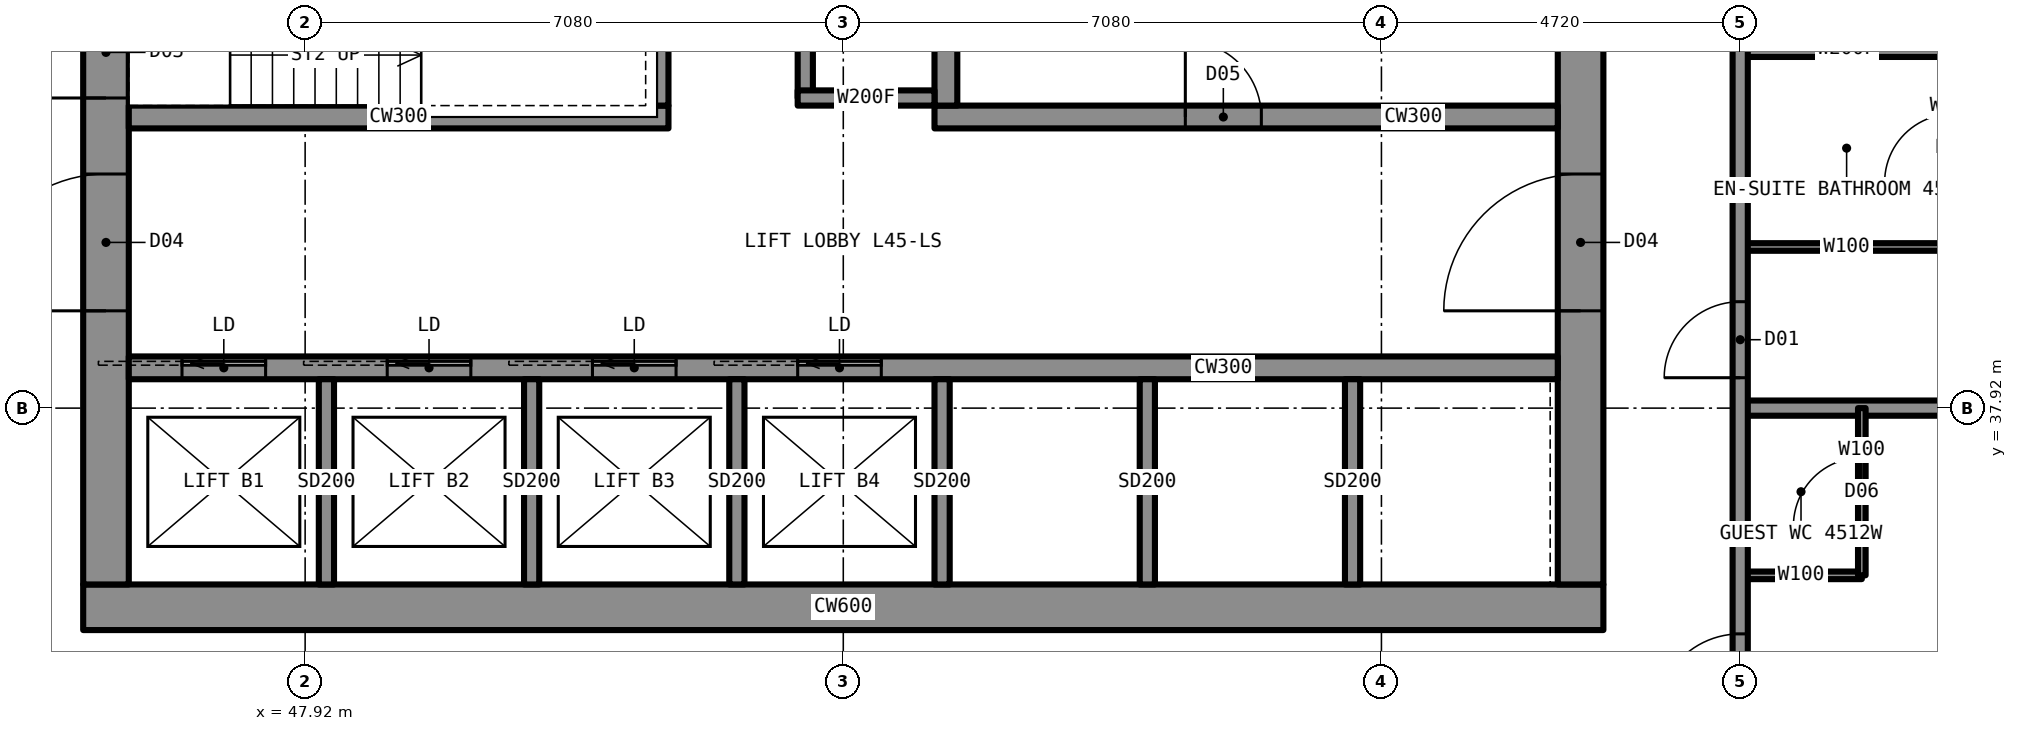
"""IFC4 building model, lengths in metres.
Left out: names, types, materials, properties, quantities, classifications, styles, units other than length and angle.
Written with IfcOpenShell. Run it as: python <this file> out.ifc"""

import sys

from ifc_helpers import new_model, si_unit, direction, frame, frame_2d, origin, place, context, subcontext, project, spatial, rectangle, extrude, element, fill, save


model = new_model("IFC4")
c1 = context("Model", 3, precision=1e-05, world=origin(), true_north=direction((0.0, 1.0)))
c2 = subcontext(c1, "Body", "Model", "MODEL_VIEW")
j1 = project(units=[si_unit("LENGTHUNIT", "METRE"), si_unit("PLANEANGLEUNIT", "RADIAN")], contexts=[c1])
p1 = place(None, origin())
s1 = spatial("IfcSite", under=j1, at=p1, CompositionType="ELEMENT")
p2 = place(p1, origin())
s2 = spatial("IfcBuilding", under=s1, at=p2, CompositionType="ELEMENT")
p3 = place(p2, frame((0.0, 0.0, 161.8)))
s3 = spatial("IfcBuildingStorey", under=s2, at=p3, CompositionType="ELEMENT", Elevation=161.8)
p4 = place(p3, frame((45.0, 35.3, 0.0), z_axis=(0.0, 0.0, 1.0), x_axis=(1.0, 0.0, 0.0)))
e1 = element("IfcWall", 1, at=p4, inside=s3, PredefinedType="SHEAR", context=c2, shape_type="SweptSolid", body=[
    extrude(rectangle(XDim=20.0, YDim=0.6, at=frame_2d((10.0, 0.0))), origin(), (0.0, 0.0, 1.0), 3.5),
])
p5 = place(p3, frame((64.7, 35.6, 0.0), z_axis=(0.0, 0.0, 1.0), x_axis=(0.0, 1.0, 0.0)))
e2 = element("IfcWall", 2, at=p5, inside=s3, PredefinedType="SHEAR", context=c2, shape_type="SweptSolid", body=[
    extrude(rectangle(XDim=18.8, YDim=0.6, at=frame_2d((9.4, 0.0))), origin(), (0.0, 0.0, 1.0), 3.5),
])
p6 = place(p5, frame((13.4, 0.0, 0.0)))
e3 = element("IfcOpeningElement", 3, at=p6, cuts=e2, PredefinedType="OPENING", context=c2, shape_type="SweptSolid", body=[
    extrude(rectangle(XDim=1.8, YDim=2.2, at=frame_2d((0.9, 1.1))), frame((0.0, 0.31, 0.0), z_axis=(0.0, -1.0, 0.0), x_axis=(1.0, 0.0, 0.0)), (0.0, 0.0, 1.0), 0.62),
])
p7 = place(p5, frame((3.6, 0.0, 0.0)))
e4 = element("IfcOpeningElement", 4, at=p7, cuts=e2, PredefinedType="OPENING", context=c2, shape_type="SweptSolid", body=[
    extrude(rectangle(XDim=1.8, YDim=2.2, at=frame_2d((0.9, 1.1))), frame((0.0, 0.31, 0.0), z_axis=(0.0, -1.0, 0.0), x_axis=(1.0, 0.0, 0.0)), (0.0, 0.0, 1.0), 0.62),
])
p8 = place(p3, frame((45.3, 35.6, 0.0), z_axis=(0.0, 0.0, 1.0), x_axis=(0.0, 1.0, 0.0)))
e5 = element("IfcWall", 5, at=p8, inside=s3, PredefinedType="SHEAR", context=c2, shape_type="SweptSolid", body=[
    extrude(rectangle(XDim=18.8, YDim=0.6, at=frame_2d((9.4, 0.0))), origin(), (0.0, 0.0, 1.0), 3.5),
])
p9 = place(p8, frame((13.4, 0.0, 0.0)))
e6 = element("IfcOpeningElement", 6, at=p9, cuts=e5, PredefinedType="OPENING", context=c2, shape_type="SweptSolid", body=[
    extrude(rectangle(XDim=1.8, YDim=2.2, at=frame_2d((0.9, 1.1))), frame((0.0, 0.31, 0.0), z_axis=(0.0, -1.0, 0.0), x_axis=(1.0, 0.0, 0.0)), (0.0, 0.0, 1.0), 0.62),
])
p10 = place(p8, frame((3.6, 0.0, 0.0)))
e7 = element("IfcOpeningElement", 7, at=p10, cuts=e5, PredefinedType="OPENING", context=c2, shape_type="SweptSolid", body=[
    extrude(rectangle(XDim=1.8, YDim=2.2, at=frame_2d((0.9, 1.1))), frame((0.0, 0.31, 0.0), z_axis=(0.0, -1.0, 0.0), x_axis=(1.0, 0.0, 0.0)), (0.0, 0.0, 1.0), 0.62),
])
p11 = place(p8, frame((6.4, 0.0, 0.0)))
e8 = element("IfcOpeningElement", 8, at=p11, cuts=e5, PredefinedType="OPENING", context=c2, shape_type="SweptSolid", body=[
    extrude(rectangle(XDim=1.2, YDim=2.2, at=frame_2d((0.6, 1.1))), frame((0.0, 0.31, 0.0), z_axis=(0.0, -1.0, 0.0), x_axis=(1.0, 0.0, 0.0)), (0.0, 0.0, 1.0), 0.62),
])
p12 = place(p3, frame((45.6, 38.45, 0.0), z_axis=(0.0, 0.0, 1.0), x_axis=(1.0, 0.0, 0.0)))
e9 = element("IfcWall", 9, at=p12, inside=s3, PredefinedType="SHEAR", context=c2, shape_type="SweptSolid", body=[
    extrude(rectangle(XDim=18.8, YDim=0.3, at=frame_2d((9.4, 0.0))), origin(), (0.0, 0.0, 1.0), 3.5),
])
p13 = place(p12, frame((0.7, 0.0, 0.0)))
e10 = element("IfcOpeningElement", 10, at=p13, cuts=e9, PredefinedType="OPENING", context=c2, shape_type="SweptSolid", body=[
    extrude(rectangle(XDim=1.1, YDim=2.2, at=frame_2d((0.55, 1.1))), frame((0.0, 0.16, 0.0), z_axis=(0.0, -1.0, 0.0), x_axis=(1.0, 0.0, 0.0)), (0.0, 0.0, 1.0), 0.32),
])
p14 = place(p12, frame((3.4, 0.0, 0.0)))
e11 = element("IfcOpeningElement", 11, at=p14, cuts=e9, PredefinedType="OPENING", context=c2, shape_type="SweptSolid", body=[
    extrude(rectangle(XDim=1.1, YDim=2.2, at=frame_2d((0.55, 1.1))), frame((0.0, 0.16, 0.0), z_axis=(0.0, -1.0, 0.0), x_axis=(1.0, 0.0, 0.0)), (0.0, 0.0, 1.0), 0.32),
])
p15 = place(p12, frame((6.1, 0.0, 0.0)))
e12 = element("IfcOpeningElement", 12, at=p15, cuts=e9, PredefinedType="OPENING", context=c2, shape_type="SweptSolid", body=[
    extrude(rectangle(XDim=1.1, YDim=2.2, at=frame_2d((0.55, 1.1))), frame((0.0, 0.16, 0.0), z_axis=(0.0, -1.0, 0.0), x_axis=(1.0, 0.0, 0.0)), (0.0, 0.0, 1.0), 0.32),
])
p16 = place(p12, frame((8.8, 0.0, 0.0)))
e13 = element("IfcOpeningElement", 13, at=p16, cuts=e9, PredefinedType="OPENING", context=c2, shape_type="SweptSolid", body=[
    extrude(rectangle(XDim=1.1, YDim=2.2, at=frame_2d((0.55, 1.1))), frame((0.0, 0.16, 0.0), z_axis=(0.0, -1.0, 0.0), x_axis=(1.0, 0.0, 0.0)), (0.0, 0.0, 1.0), 0.32),
])
p17 = place(p3, frame((45.6, 41.75, 0.0), z_axis=(0.0, 0.0, 1.0), x_axis=(1.0, 0.0, 0.0)))
e14 = element("IfcWall", 14, at=p17, inside=s3, PredefinedType="SHEAR", context=c2, shape_type="SweptSolid", body=[
    extrude(rectangle(XDim=7.1, YDim=0.3, at=frame_2d((3.55, 0.0))), origin(), (0.0, 0.0, 1.0), 3.5),
])
p18 = place(p3, frame((56.2, 41.75, 0.0), z_axis=(0.0, 0.0, 1.0), x_axis=(1.0, 0.0, 0.0)))
e15 = element("IfcWall", 15, at=p18, inside=s3, PredefinedType="SHEAR", context=c2, shape_type="SweptSolid", body=[
    extrude(rectangle(XDim=8.2, YDim=0.3, at=frame_2d((4.1, 0.0))), origin(), (0.0, 0.0, 1.0), 3.5),
])
p19 = place(p18, frame((3.3, 0.0, 0.0)))
e16 = element("IfcOpeningElement", 16, at=p19, cuts=e15, PredefinedType="OPENING", context=c2, shape_type="SweptSolid", body=[
    extrude(rectangle(XDim=1.0, YDim=2.1, at=frame_2d((0.5, 1.05))), frame((0.0, 0.16, 0.0), z_axis=(0.0, -1.0, 0.0), x_axis=(1.0, 0.0, 0.0)), (0.0, 0.0, 1.0), 0.32),
])
p20 = place(p3, frame((52.55, 41.9, 0.0), z_axis=(0.0, 0.0, 1.0), x_axis=(0.0, 1.0, 0.0)))
e17 = element("IfcWall", 17, at=p20, inside=s3, PredefinedType="SHEAR", context=c2, shape_type="SweptSolid", body=[
    extrude(rectangle(XDim=6.2, YDim=0.3, at=frame_2d((3.1, 0.0))), origin(), (0.0, 0.0, 1.0), 3.5),
])
p21 = place(p20, frame((4.125, 0.0, 0.0)))
e18 = element("IfcOpeningElement", 18, at=p21, cuts=e17, PredefinedType="OPENING", context=c2, shape_type="SweptSolid", body=[
    extrude(rectangle(XDim=1.2, YDim=2.2, at=frame_2d((0.6, 1.1))), frame((0.0, 0.16, 0.0), z_axis=(0.0, -1.0, 0.0), x_axis=(1.0, 0.0, 0.0)), (0.0, 0.0, 1.0), 0.32),
])
p22 = place(p3, frame((56.35, 41.9, 0.0), z_axis=(0.0, 0.0, 1.0), x_axis=(0.0, 1.0, 0.0)))
e19 = element("IfcWall", 19, at=p22, inside=s3, PredefinedType="SHEAR", context=c2, shape_type="SweptSolid", body=[
    extrude(rectangle(XDim=9.5, YDim=0.3, at=frame_2d((4.75, 0.0))), origin(), (0.0, 0.0, 1.0), 3.5),
])
p23 = place(p22, frame((7.1, 0.0, 0.0)))
e20 = element("IfcOpeningElement", 20, at=p23, cuts=e19, PredefinedType="OPENING", context=c2, shape_type="SweptSolid", body=[
    extrude(rectangle(XDim=1.8, YDim=2.2, at=frame_2d((0.9, 1.1))), frame((0.0, 0.16, 0.0), z_axis=(0.0, -1.0, 0.0), x_axis=(1.0, 0.0, 0.0)), (0.0, 0.0, 1.0), 0.32),
])
p24 = place(p3, frame((66.8, 42.64, 0.0), z_axis=(0.0, 0.0, 1.0), x_axis=(1.0, 0.0, 0.0)))
e21 = element("IfcWall", 21, at=p24, inside=s3, PredefinedType="PARTITIONING", context=c2, shape_type="SweptSolid", body=[
    extrude(rectangle(XDim=2.8, YDim=0.2, at=frame_2d((1.4, 0.0))), origin(), (0.0, 0.0, 1.0), 2.73),
])
p25 = place(p3, frame((66.8, 40.04, 0.0), z_axis=(0.0, 0.0, 1.0), x_axis=(1.0, 0.0, 0.0)))
e22 = element("IfcWall", 22, at=p25, inside=s3, PredefinedType="PARTITIONING", context=c2, shape_type="SweptSolid", body=[
    extrude(rectangle(XDim=2.8, YDim=0.1, at=frame_2d((1.4, 0.0))), origin(), (0.0, 0.0, 1.0), 3.33),
])
p26 = place(p3, frame((66.8, 37.92, 0.0), z_axis=(0.0, 0.0, 1.0), x_axis=(1.0, 0.0, 0.0)))
e23 = element("IfcWall", 23, at=p26, inside=s3, PredefinedType="PARTITIONING", context=c2, shape_type="SweptSolid", body=[
    extrude(rectangle(XDim=7.2, YDim=0.2, at=frame_2d((3.6, 0.0))), origin(), (0.0, 0.0, 1.0), 2.573),
])
p27 = place(p3, frame((66.8, 35.72, 0.0), z_axis=(0.0, 0.0, 1.0), x_axis=(1.0, 0.0, 0.0)))
e24 = element("IfcWall", 24, at=p27, inside=s3, PredefinedType="PARTITIONING", context=c2, shape_type="SweptSolid", body=[
    extrude(rectangle(XDim=1.6, YDim=0.1, at=frame_2d((0.8, 0.0))), origin(), (0.0, 0.0, 1.0), 3.33),
])
p28 = place(p3, frame((66.8, 33.22, 0.0), z_axis=(0.0, 0.0, 1.0), x_axis=(0.0, 1.0, 0.0)))
e25 = element("IfcWall", 25, at=p28, inside=s3, PredefinedType="PARTITIONING", context=c2, shape_type="SweptSolid", body=[
    extrude(rectangle(XDim=23.56, YDim=0.2, at=frame_2d((11.78, 0.0))), origin(), (0.0, 0.0, 1.0), 3.33),
])
p29 = place(p28, frame((5.1, 0.0, 0.0)))
e26 = element("IfcOpeningElement", 26, at=p29, cuts=e25, PredefinedType="OPENING", context=c2, shape_type="SweptSolid", body=[
    extrude(rectangle(XDim=1.0, YDim=2.2, at=frame_2d((0.5, 1.1))), frame((0.0, 0.11, 0.0), z_axis=(0.0, -1.0, 0.0), x_axis=(1.0, 0.0, 0.0)), (0.0, 0.0, 1.0), 0.22),
])
p30 = place(p28, frame((12.42, 0.0, 0.0)))
e27 = element("IfcOpeningElement", 27, at=p30, cuts=e25, PredefinedType="OPENING", context=c2, shape_type="SweptSolid", body=[
    extrude(rectangle(XDim=1.0, YDim=2.2, at=frame_2d((0.5, 1.1))), frame((0.0, 0.11, 0.0), z_axis=(0.0, -1.0, 0.0), x_axis=(1.0, 0.0, 0.0)), (0.0, 0.0, 1.0), 0.22),
])
p31 = place(p28, frame((22.03, 0.0, 0.0)))
e28 = element("IfcOpeningElement", 28, at=p31, cuts=e25, PredefinedType="OPENING", context=c2, shape_type="SweptSolid", body=[
    extrude(rectangle(XDim=1.1, YDim=2.2, at=frame_2d((0.55, 1.1))), frame((0.0, 0.11, 0.0), z_axis=(0.0, -1.0, 0.0), x_axis=(1.0, 0.0, 0.0)), (0.0, 0.0, 1.0), 0.22),
])
p32 = place(p28, frame((0.63, 0.0, 0.0)))
e29 = element("IfcOpeningElement", 29, at=p32, cuts=e25, PredefinedType="OPENING", context=c2, shape_type="SweptSolid", body=[
    extrude(rectangle(XDim=1.1, YDim=2.2, at=frame_2d((0.55, 1.1))), frame((0.0, 0.11, 0.0), z_axis=(0.0, -1.0, 0.0), x_axis=(1.0, 0.0, 0.0)), (0.0, 0.0, 1.0), 0.22),
])
p33 = place(p3, frame((68.4, 35.72, 0.0), z_axis=(0.0, 0.0, 1.0), x_axis=(0.0, 1.0, 0.0)))
e30 = element("IfcWall", 30, at=p33, inside=s3, PredefinedType="PARTITIONING", context=c2, shape_type="SweptSolid", body=[
    extrude(rectangle(XDim=2.2, YDim=0.1, at=frame_2d((1.1, 0.0))), origin(), (0.0, 0.0, 1.0), 3.33),
])
p34 = place(p33, frame((0.65, 0.0, 0.0)))
e31 = element("IfcOpeningElement", 31, at=p34, cuts=e30, PredefinedType="OPENING", context=c2, shape_type="SweptSolid", body=[
    extrude(rectangle(XDim=0.9, YDim=2.1, at=frame_2d((0.45, 1.05))), frame((0.0, 0.06, 0.0), z_axis=(0.0, -1.0, 0.0), x_axis=(1.0, 0.0, 0.0)), (0.0, 0.0, 1.0), 0.12),
])
p35 = place(p3, frame((54.5, 42.0, 0.0), z_axis=(0.0, 0.0, 1.0), x_axis=(0.0, 1.0, 0.0)))
e32 = element("IfcWall", 32, at=p35, inside=s3, PredefinedType="PARTITIONING", context=c2, shape_type="SweptSolid", body=[
    extrude(rectangle(XDim=2.0, YDim=0.2, at=frame_2d((1.0, 0.0))), origin(), (0.0, 0.0, 1.0), 3.33),
])
p36 = place(p35, frame((0.5, 0.0, 0.0)))
e33 = element("IfcOpeningElement", 33, at=p36, cuts=e32, PredefinedType="OPENING", context=c2, shape_type="SweptSolid", body=[
    extrude(rectangle(XDim=1.0, YDim=2.1, at=frame_2d((0.5, 1.05))), frame((0.0, 0.11, 0.0), z_axis=(0.0, -1.0, 0.0), x_axis=(1.0, 0.0, 0.0)), (0.0, 0.0, 1.0), 0.22),
])
p37 = place(p3, frame((54.4, 42.0, 0.0), z_axis=(0.0, 0.0, 1.0), x_axis=(1.0, 0.0, 0.0)))
e34 = element("IfcWall", 34, at=p37, inside=s3, PredefinedType="PARTITIONING", context=c2, shape_type="SweptSolid", body=[
    extrude(rectangle(XDim=1.8, YDim=0.2, at=frame_2d((0.9, 0.0))), origin(), (0.0, 0.0, 1.0), 3.33),
])
for number, where, z_axis, x_axis in (
    (35, (48.2, 35.6, 0.0), (0.0, 0.0, 1.0), (0.0, 1.0, 0.0)),
    (36, (50.9, 35.6, 0.0), (0.0, 0.0, 1.0), (0.0, 1.0, 0.0)),
    (37, (53.6, 35.6, 0.0), (0.0, 0.0, 1.0), (0.0, 1.0, 0.0)),
    (38, (56.3, 35.6, 0.0), (0.0, 0.0, 1.0), (0.0, 1.0, 0.0)),
    (39, (59.0, 35.6, 0.0), (0.0, 0.0, 1.0), (0.0, 1.0, 0.0)),
    (40, (61.7, 35.6, 0.0), (0.0, 0.0, 1.0), (0.0, 1.0, 0.0)),
):
    element("IfcWall", number, at=place(p3, frame(where, z_axis=z_axis, x_axis=x_axis)), inside=s3, PredefinedType="PARTITIONING", context=c2, shape_type="SweptSolid", body=[
        extrude(rectangle(XDim=2.7, YDim=0.2, at=frame_2d((1.35, 0.0))), origin(), (0.0, 0.0, 1.0), 3.33),
    ])
p38 = place(p29, origin())
e41 = element("IfcDoor", 41, at=p38, inside=s3, OperationType="SINGLE_SWING_LEFT", PredefinedType="DOOR", context=c2, shape_type="SweptSolid", body=[
    extrude(rectangle(XDim=1.0, YDim=2.2, at=frame_2d((0.5, 1.1))), frame((0.0, 0.025, 0.0), z_axis=(0.0, -1.0, 0.0), x_axis=(1.0, 0.0, 0.0)), (0.0, 0.0, 1.0), 0.05),
])
fill(e26, e41)
p39 = place(p32, origin())
e42 = element("IfcDoor", 42, at=p39, inside=s3, OperationType="SINGLE_SWING_LEFT", PredefinedType="DOOR", context=c2, shape_type="SweptSolid", body=[
    extrude(rectangle(XDim=1.1, YDim=2.2, at=frame_2d((0.55, 1.1))), frame((0.0, 0.025, 0.0), z_axis=(0.0, -1.0, 0.0), x_axis=(1.0, 0.0, 0.0)), (0.0, 0.0, 1.0), 0.05),
])
fill(e29, e42)
p40 = place(p34, origin())
e43 = element("IfcDoor", 43, at=p40, inside=s3, OperationType="SINGLE_SWING_LEFT", PredefinedType="DOOR", context=c2, shape_type="SweptSolid", body=[
    extrude(rectangle(XDim=0.9, YDim=2.1, at=frame_2d((0.45, 1.05))), frame((0.0, 0.025, 0.0), z_axis=(0.0, -1.0, 0.0), x_axis=(1.0, 0.0, 0.0)), (0.0, 0.0, 1.0), 0.05),
])
fill(e31, e43)
p41 = place(p36, origin())
e44 = element("IfcDoor", 44, at=p41, inside=s3, OperationType="SINGLE_SWING_LEFT", PredefinedType="DOOR", context=c2, shape_type="SweptSolid", body=[
    extrude(rectangle(XDim=1.0, YDim=2.1, at=frame_2d((0.5, 1.05))), frame((0.0, 0.025, 0.0), z_axis=(0.0, -1.0, 0.0), x_axis=(1.0, 0.0, 0.0)), (0.0, 0.0, 1.0), 0.05),
])
fill(e33, e44)
p42 = place(p10, origin())
e45 = element("IfcDoor", 45, at=p42, inside=s3, OperationType="DOUBLE_DOOR_SINGLE_SWING", PredefinedType="DOOR", context=c2, shape_type="SweptSolid", body=[
    extrude(rectangle(XDim=1.8, YDim=2.2, at=frame_2d((0.9, 1.1))), frame((0.0, 0.025, 0.0), z_axis=(0.0, -1.0, 0.0), x_axis=(1.0, 0.0, 0.0)), (0.0, 0.0, 1.0), 0.05),
])
fill(e7, e45)
p43 = place(p7, origin())
e46 = element("IfcDoor", 46, at=p43, inside=s3, OperationType="DOUBLE_DOOR_SINGLE_SWING", PredefinedType="DOOR", context=c2, shape_type="SweptSolid", body=[
    extrude(rectangle(XDim=1.8, YDim=2.2, at=frame_2d((0.9, 1.1))), frame((0.0, 0.025, 0.0), z_axis=(0.0, -1.0, 0.0), x_axis=(1.0, 0.0, 0.0)), (0.0, 0.0, 1.0), 0.05),
])
fill(e4, e46)
p44 = place(p11, origin())
e47 = element("IfcDoor", 47, at=p44, inside=s3, OperationType="SINGLE_SWING_LEFT", PredefinedType="DOOR", context=c2, shape_type="SweptSolid", body=[
    extrude(rectangle(XDim=1.2, YDim=2.2, at=frame_2d((0.6, 1.1))), frame((0.0, 0.025, 0.0), z_axis=(0.0, -1.0, 0.0), x_axis=(1.0, 0.0, 0.0)), (0.0, 0.0, 1.0), 0.05),
])
fill(e8, e47)
p45 = place(p19, origin())
e48 = element("IfcDoor", 48, at=p45, inside=s3, OperationType="SINGLE_SWING_LEFT", PredefinedType="DOOR", context=c2, shape_type="SweptSolid", body=[
    extrude(rectangle(XDim=1.0, YDim=2.1, at=frame_2d((0.5, 1.05))), frame((0.0, 0.025, 0.0), z_axis=(0.0, -1.0, 0.0), x_axis=(1.0, 0.0, 0.0)), (0.0, 0.0, 1.0), 0.05),
])
fill(e16, e48)
p46 = place(p13, origin())
e49 = element("IfcDoor", 49, at=p46, inside=s3, OperationType="SLIDING_TO_LEFT", PredefinedType="DOOR", context=c2, shape_type="SweptSolid", body=[
    extrude(rectangle(XDim=1.1, YDim=2.2, at=frame_2d((0.55, 1.1))), frame((0.0, 0.025, 0.0), z_axis=(0.0, -1.0, 0.0), x_axis=(1.0, 0.0, 0.0)), (0.0, 0.0, 1.0), 0.05),
])
fill(e10, e49)
p47 = place(p14, origin())
e50 = element("IfcDoor", 50, at=p47, inside=s3, OperationType="SLIDING_TO_LEFT", PredefinedType="DOOR", context=c2, shape_type="SweptSolid", body=[
    extrude(rectangle(XDim=1.1, YDim=2.2, at=frame_2d((0.55, 1.1))), frame((0.0, 0.025, 0.0), z_axis=(0.0, -1.0, 0.0), x_axis=(1.0, 0.0, 0.0)), (0.0, 0.0, 1.0), 0.05),
])
fill(e11, e50)
p48 = place(p15, origin())
e51 = element("IfcDoor", 51, at=p48, inside=s3, OperationType="SLIDING_TO_LEFT", PredefinedType="DOOR", context=c2, shape_type="SweptSolid", body=[
    extrude(rectangle(XDim=1.1, YDim=2.2, at=frame_2d((0.55, 1.1))), frame((0.0, 0.025, 0.0), z_axis=(0.0, -1.0, 0.0), x_axis=(1.0, 0.0, 0.0)), (0.0, 0.0, 1.0), 0.05),
])
fill(e12, e51)
p49 = place(p16, origin())
e52 = element("IfcDoor", 52, at=p49, inside=s3, OperationType="SLIDING_TO_LEFT", PredefinedType="DOOR", context=c2, shape_type="SweptSolid", body=[
    extrude(rectangle(XDim=1.1, YDim=2.2, at=frame_2d((0.55, 1.1))), frame((0.0, 0.025, 0.0), z_axis=(0.0, -1.0, 0.0), x_axis=(1.0, 0.0, 0.0)), (0.0, 0.0, 1.0), 0.05),
])
fill(e13, e52)
save(model, sys.argv[1])
